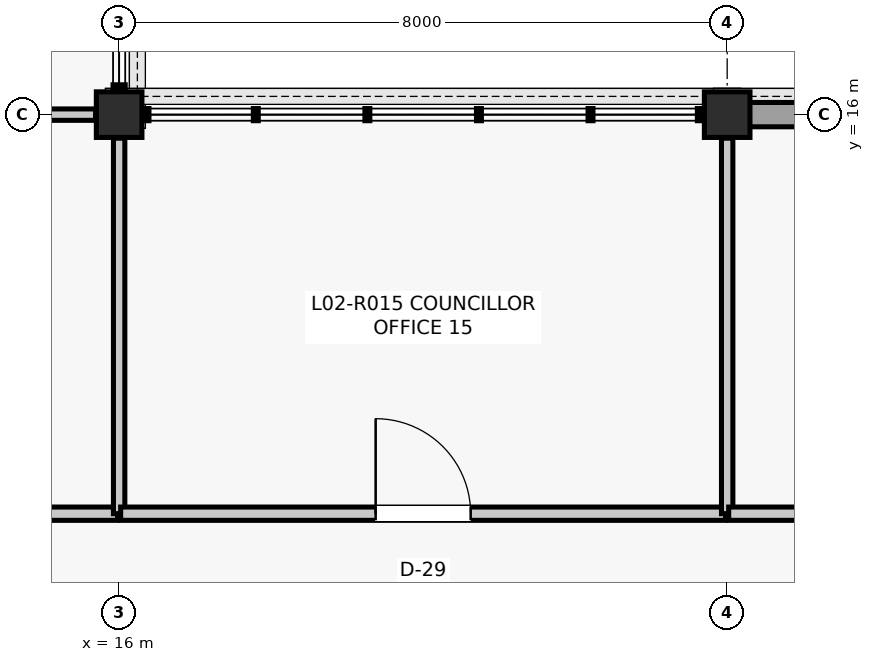
"""IFC4 building model, lengths in metres.
Left out: names, types, materials, properties, quantities, classifications, styles, units other than length and angle.
Written with IfcOpenShell. Run it as: python <this file> out.ifc"""

import sys

from ifc_helpers import new_model, si_unit, direction, frame, frame_2d, origin, origin_2d, place, context, subcontext, project, spatial, rectangle, extrude, element, fill, save


model = new_model("IFC4")
c1 = context("Model", 3, precision=1e-05, world=origin(), true_north=direction((0.0, 1.0)))
c2 = subcontext(c1, "Body", "Model", "MODEL_VIEW")
j1 = project(units=[si_unit("LENGTHUNIT", "METRE"), si_unit("PLANEANGLEUNIT", "RADIAN")], contexts=[c1])
p1 = place(None, origin())
s1 = spatial("IfcSite", under=j1, at=p1, CompositionType="ELEMENT")
p2 = place(p1, origin())
s2 = spatial("IfcBuilding", under=s1, at=p2, CompositionType="ELEMENT")
p3 = place(p2, frame((0.0, 0.0, 9.9)))
s3 = spatial("IfcBuildingStorey", under=s2, at=p3, CompositionType="ELEMENT", Elevation=9.9)
for number, where, z_axis, x_axis in (
    (1, (16.0, 16.0, 0.0), (0.0, 0.0, 1.0), (1.0, 0.0, 0.0)),
    (2, (24.0, 16.0, 0.0), (0.0, 0.0, 1.0), (1.0, 0.0, 0.0)),
):
    element("IfcColumn", number, at=place(p3, frame(where, z_axis=z_axis, x_axis=x_axis)), inside=s3, PredefinedType="COLUMN", context=c2, shape_type="SweptSolid", body=[
        extrude(rectangle(XDim=0.6, YDim=0.6, at=origin_2d()), origin(), (0.0, 0.0, 1.0), 3.96),
    ])
p4 = place(p3, frame((24.285, 16.0, 0.0), z_axis=(0.0, 0.0, 1.0), x_axis=(1.0, 0.0, 0.0)))
e3 = element("IfcWall", 3, at=p4, inside=s3, PredefinedType="SOLIDWALL", context=c2, shape_type="SweptSolid", body=[
    extrude(rectangle(XDim=7.43, YDim=0.32, at=frame_2d((3.715, 0.0))), origin(), (0.0, 0.0, 1.0), 3.179),
])
p5 = place(p4, frame((3.04, 0.0, 0.9)))
e4 = element("IfcOpeningElement", 4, at=p5, cuts=e3, PredefinedType="OPENING", context=c2, shape_type="SweptSolid", body=[
    extrude(rectangle(XDim=1.35, YDim=1.9, at=frame_2d((0.675, 0.95))), frame((0.0, 0.17, 0.0), z_axis=(0.0, -1.0, 0.0), x_axis=(1.0, 0.0, 0.0)), (0.0, 0.0, 1.0), 0.34),
])
p6 = place(p3, frame((10.7, 10.75, 0.0), z_axis=(0.0, 0.0, 1.0), x_axis=(1.0, 0.0, 0.0)))
e5 = element("IfcWall", 5, at=p6, inside=s3, PredefinedType="PARTITIONING", context=c2, shape_type="SweptSolid", body=[
    extrude(rectangle(XDim=5.28, YDim=0.175, at=frame_2d((2.64, 0.0))), origin(), (0.0, 0.0, 1.0), 3.236),
])
p7 = place(p6, frame((2.15, 0.0, 0.0)))
e6 = element("IfcOpeningElement", 6, at=p7, cuts=e5, PredefinedType="OPENING", context=c2, shape_type="SweptSolid", body=[
    extrude(rectangle(XDim=0.98, YDim=2.15, at=frame_2d((0.49, 1.075))), frame((0.0, 0.097, 0.0), z_axis=(0.0, -1.0, 0.0), x_axis=(1.0, 0.0, 0.0)), (0.0, 0.0, 1.0), 0.195),
])
p8 = place(p3, frame((10.75, 16.0, 0.0), z_axis=(0.0, 0.0, 1.0), x_axis=(1.0, 0.0, 0.0)))
e7 = element("IfcWall", 7, at=p8, inside=s3, PredefinedType="PARTITIONING", context=c2, shape_type="SweptSolid", body=[
    extrude(rectangle(XDim=4.94, YDim=0.15, at=frame_2d((2.47, 0.0))), origin(), (0.0, 0.0, 1.0), 3.166),
])
p9 = place(p3, frame((16.0, 10.75, 0.0), z_axis=(0.0, 0.0, 1.0), x_axis=(0.0, 1.0, 0.0)))
e8 = element("IfcWall", 8, at=p9, inside=s3, PredefinedType="PARTITIONING", context=c2, shape_type="SweptSolid", body=[
    extrude(rectangle(XDim=4.94, YDim=0.15, at=frame_2d((2.47, 0.0))), origin(), (0.0, 0.0, 1.0), 3.236),
])
p10 = place(p3, frame((16.02, 10.75, 0.0), z_axis=(0.0, 0.0, 1.0), x_axis=(1.0, 0.0, 0.0)))
e9 = element("IfcWall", 9, at=p10, inside=s3, PredefinedType="PARTITIONING", context=c2, shape_type="SweptSolid", body=[
    extrude(rectangle(XDim=7.96, YDim=0.175, at=frame_2d((3.98, 0.0))), origin(), (0.0, 0.0, 1.0), 3.172),
])
p11 = place(p10, frame((3.355, 0.0, 0.0)))
e10 = element("IfcOpeningElement", 10, at=p11, cuts=e9, PredefinedType="OPENING", context=c2, shape_type="SweptSolid", body=[
    extrude(rectangle(XDim=1.25, YDim=2.18, at=frame_2d((0.625, 1.09))), frame((0.0, 0.097, 0.0), z_axis=(0.0, -1.0, 0.0), x_axis=(1.0, 0.0, 0.0)), (0.0, 0.0, 1.0), 0.195),
])
p12 = place(p3, frame((24.0, 10.75, 0.0), z_axis=(0.0, 0.0, 1.0), x_axis=(0.0, 1.0, 0.0)))
e11 = element("IfcWall", 11, at=p12, inside=s3, PredefinedType="PARTITIONING", context=c2, shape_type="SweptSolid", body=[
    extrude(rectangle(XDim=4.94, YDim=0.15, at=frame_2d((2.47, 0.0))), origin(), (0.0, 0.0, 1.0), 3.172),
])
p13 = place(p3, frame((24.02, 10.75, 0.0), z_axis=(0.0, 0.0, 1.0), x_axis=(1.0, 0.0, 0.0)))
e12 = element("IfcWall", 12, at=p13, inside=s3, PredefinedType="PARTITIONING", context=c2, shape_type="SweptSolid", body=[
    extrude(rectangle(XDim=7.96, YDim=0.175, at=frame_2d((3.98, 0.0))), origin(), (0.0, 0.0, 1.0), 3.172),
])
p14 = place(p13, frame((3.49, 0.0, 0.0)))
e13 = element("IfcOpeningElement", 13, at=p14, cuts=e12, PredefinedType="OPENING", context=c2, shape_type="SweptSolid", body=[
    extrude(rectangle(XDim=0.98, YDim=2.15, at=frame_2d((0.49, 1.075))), frame((0.0, 0.097, 0.0), z_axis=(0.0, -1.0, 0.0), x_axis=(1.0, 0.0, 0.0)), (0.0, 0.0, 1.0), 0.195),
])
p15 = place(p11, origin())
e14 = element("IfcDoor", 14, at=p15, inside=s3, OperationType="SINGLE_SWING_LEFT", PredefinedType="DOOR", context=c2, shape_type="SweptSolid", body=[
    extrude(rectangle(XDim=1.25, YDim=2.18, at=frame_2d((0.625, 1.09))), frame((0.0, 0.025, 0.0), z_axis=(0.0, -1.0, 0.0), x_axis=(1.0, 0.0, 0.0)), (0.0, 0.0, 1.0), 0.05),
])
fill(e10, e14)
save(model, sys.argv[1])
